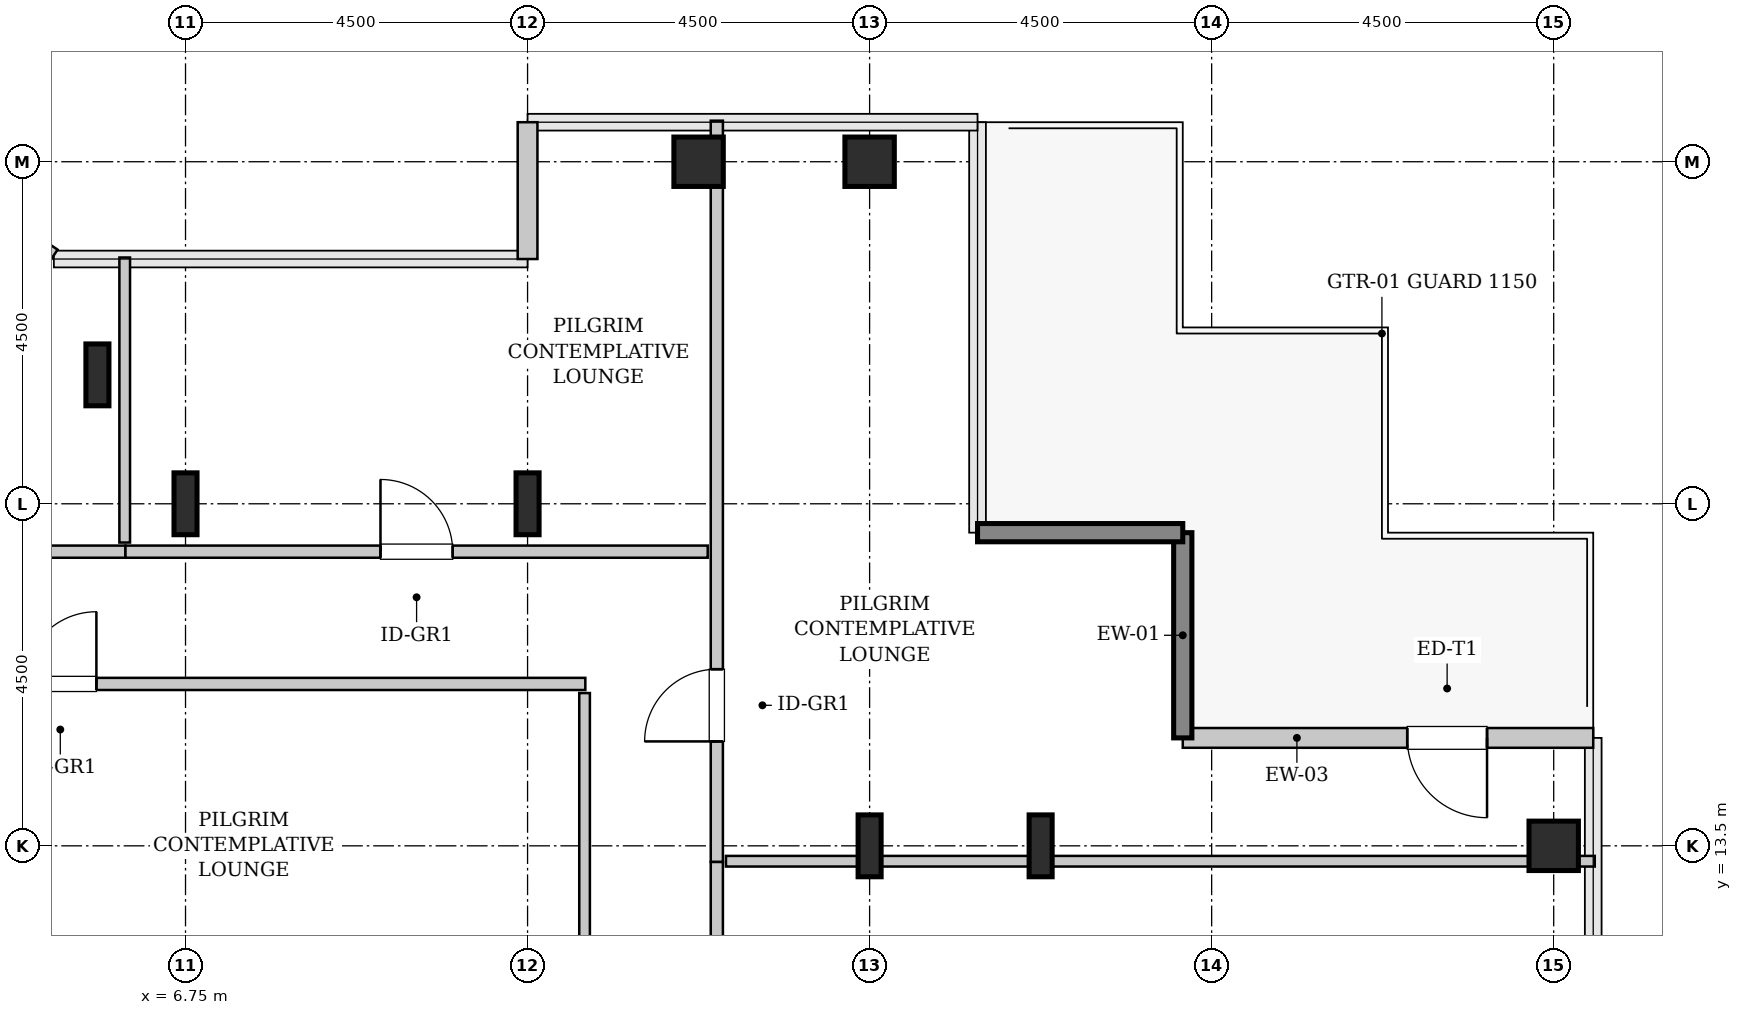
"""IFC4 building model, lengths in metres.
Left out: names, types, materials, properties, quantities, classifications, styles, units other than length and angle.
Written with IfcOpenShell. Run it as: python <this file> out.ifc"""

import sys

from ifc_helpers import new_model, si_unit, direction, frame, frame_2d, origin, origin_2d, place, context, subcontext, project, spatial, rectangle, hollow_rectangle, i_section, extrude, source, transform, mapped, element, fill, save


model = new_model("IFC4")
c1 = context("Model", 3, precision=1e-05, world=origin(), true_north=direction((0.0, 1.0)))
c2 = subcontext(c1, "Body", "Model", "MODEL_VIEW")
j1 = project(units=[si_unit("LENGTHUNIT", "METRE"), si_unit("PLANEANGLEUNIT", "RADIAN")], contexts=[c1])
p1 = place(None, origin())
s1 = spatial("IfcSite", under=j1, at=p1, CompositionType="ELEMENT")
p2 = place(p1, origin())
s2 = spatial("IfcBuilding", under=s1, at=p2, CompositionType="ELEMENT")
p3 = place(p2, frame((0.0, 0.0, 221.8)))
s3 = spatial("IfcBuildingStorey", under=s2, at=p3, CompositionType="ELEMENT", Elevation=221.8)
m1 = source(origin(), c2, "Body", "SweptSolid", [
    extrude(i_section(OverallWidth=0.303, OverallDepth=0.814, WebThickness=0.021, FlangeThickness=0.04, FilletRadius=0.03, at=origin_2d()), origin(), (0.0, 0.0, 1.0), 3.8),
])
for number, where, z_axis, x_axis in (
    (1, (5.591, 19.696, 0.0), (0.0, 0.0, 1.0), (1.0, 0.0, 0.0)),
    (2, (6.75, 18.0, 0.0), (0.0, 0.0, 1.0), (1.0, 0.0, 0.0)),
    (3, (11.25, 18.0, 0.0), (0.0, 0.0, 1.0), (1.0, 0.0, 0.0)),
):
    element("IfcColumn", number, at=place(p3, frame(where, z_axis=z_axis, x_axis=x_axis)), inside=s3, PredefinedType="COLUMN", context=c2, shape_type="MappedRepresentation", body=[
        mapped(m1, transform((0.0, 0.0, 0.0), x_axis=(1.0, 0.0, 0.0), y_axis=(0.0, 1.0, 0.0), z_axis=(0.0, 0.0, 1.0), scale=1.0)),
    ])
m2 = source(origin(), c2, "Body", "SweptSolid", [
    extrude(hollow_rectangle(XDim=0.65, YDim=0.65, WallThickness=0.032, InnerFilletRadius=0.032, OuterFilletRadius=0.064, at=origin_2d()), origin(), (0.0, 0.0, 1.0), 3.8),
])
p4 = place(p3, frame((13.5, 22.5, 0.0), z_axis=(0.0, 0.0, 1.0), x_axis=(1.0, 0.0, 0.0)))
e4 = element("IfcColumn", 4, at=p4, inside=s3, PredefinedType="COLUMN", context=c2, shape_type="MappedRepresentation", body=[
    mapped(m2, transform((0.0, 0.0, 0.0), x_axis=(1.0, 0.0, 0.0), y_axis=(0.0, 1.0, 0.0), z_axis=(0.0, 0.0, 1.0), scale=1.0)),
])
p5 = place(p3, frame((15.75, 13.5, 0.0), z_axis=(0.0, 0.0, 1.0), x_axis=(1.0, 0.0, 0.0)))
e5 = element("IfcColumn", 5, at=p5, inside=s3, PredefinedType="COLUMN", context=c2, shape_type="MappedRepresentation", body=[
    mapped(m1, transform((0.0, 0.0, 0.0), x_axis=(1.0, 0.0, 0.0), y_axis=(0.0, 1.0, 0.0), z_axis=(0.0, 0.0, 1.0), scale=1.0)),
])
p6 = place(p3, frame((15.75, 22.5, 0.0), z_axis=(0.0, 0.0, 1.0), x_axis=(1.0, 0.0, 0.0)))
e6 = element("IfcColumn", 6, at=p6, inside=s3, PredefinedType="COLUMN", context=c2, shape_type="MappedRepresentation", body=[
    mapped(m2, transform((0.0, 0.0, 0.0), x_axis=(1.0, 0.0, 0.0), y_axis=(0.0, 1.0, 0.0), z_axis=(0.0, 0.0, 1.0), scale=1.0)),
])
p7 = place(p3, frame((18.0, 13.5, 0.0), z_axis=(0.0, 0.0, 1.0), x_axis=(1.0, 0.0, 0.0)))
e7 = element("IfcColumn", 7, at=p7, inside=s3, PredefinedType="COLUMN", context=c2, shape_type="MappedRepresentation", body=[
    mapped(m1, transform((0.0, 0.0, 0.0), x_axis=(1.0, 0.0, 0.0), y_axis=(0.0, 1.0, 0.0), z_axis=(0.0, 0.0, 1.0), scale=1.0)),
])
p8 = place(p3, frame((24.75, 13.5, 0.0), z_axis=(0.0, 0.0, 1.0), x_axis=(1.0, 0.0, 0.0)))
e8 = element("IfcColumn", 8, at=p8, inside=s3, PredefinedType="COLUMN", context=c2, shape_type="MappedRepresentation", body=[
    mapped(m2, transform((0.0, 0.0, 0.0), x_axis=(1.0, 0.0, 0.0), y_axis=(0.0, 1.0, 0.0), z_axis=(0.0, 0.0, 1.0), scale=1.0)),
])
m3 = source(origin(), c2, "Body", "SweptSolid", [
    extrude(rectangle(XDim=5.4, YDim=0.26, at=frame_2d((2.7, 0.0))), origin(), (0.0, 0.0, 1.0), 3.55),
])
p9 = place(p3, frame((25.27, 14.92, 0.0), z_axis=(0.0, 0.0, 1.0), x_axis=(-1.0, 0.0, 0.0)))
e9 = element("IfcWall", 9, at=p9, inside=s3, PredefinedType="SOLIDWALL", context=c2, shape_type="MappedRepresentation", body=[
    mapped(m3, transform((0.0, 0.0, 0.0), x_axis=(1.0, 0.0, 0.0), y_axis=(0.0, 1.0, 0.0), z_axis=(0.0, 0.0, 1.0), scale=1.0)),
])
p10 = place(p9, frame((1.397, 0.0, 0.0)))
e10 = element("IfcOpeningElement", 10, at=p10, cuts=e9, PredefinedType="OPENING", context=c2, shape_type="SweptSolid", body=[
    extrude(rectangle(XDim=1.05, YDim=2.2, at=frame_2d((0.525, 1.1))), frame((0.0, 0.14, 0.0), z_axis=(0.0, -1.0, 0.0), x_axis=(1.0, 0.0, 0.0)), (0.0, 0.0, 1.0), 0.28),
])
m4 = source(origin(), c2, "Body", "SweptSolid", [
    extrude(rectangle(XDim=2.7, YDim=0.24, at=frame_2d((1.35, 0.0))), origin(), (0.0, 0.0, 1.0), 3.55),
])
for number, where, z_axis, x_axis in (
    (11, (19.87, 14.92, 0.0), (0.0, 0.0, 1.0), (0.0, 1.0, 0.0)),
    (12, (19.87, 17.62, 0.0), (0.0, 0.0, 1.0), (-1.0, 0.0, 0.0)),
):
    element("IfcWall", number, at=place(p3, frame(where, z_axis=z_axis, x_axis=x_axis)), inside=s3, PredefinedType="SHEAR", context=c2, shape_type="MappedRepresentation", body=[
        mapped(m4, transform((0.0, 0.0, 0.0), x_axis=(1.0, 0.0, 0.0), y_axis=(0.0, 1.0, 0.0), z_axis=(0.0, 0.0, 1.0), scale=1.0)),
    ])
m5 = source(origin(), c2, "Body", "SweptSolid", [
    extrude(rectangle(XDim=1.8, YDim=0.26, at=frame_2d((0.9, 0.0))), origin(), (0.0, 0.0, 1.0), 3.55),
])
p11 = place(p3, frame((11.25, 23.02, 0.0), z_axis=(0.0, 0.0, 1.0), x_axis=(0.0, -1.0, 0.0)))
e13 = element("IfcWall", 13, at=p11, inside=s3, PredefinedType="SOLIDWALL", context=c2, shape_type="MappedRepresentation", body=[
    mapped(m5, transform((0.0, 0.0, 0.0), x_axis=(1.0, 0.0, 0.0), y_axis=(0.0, 1.0, 0.0), z_axis=(0.0, 0.0, 1.0), scale=1.0)),
])
m6 = source(origin(), c2, "Body", "SweptSolid", [
    extrude(rectangle(XDim=1.469, YDim=0.26, at=frame_2d((0.734, 0.0))), origin(), (0.0, 0.0, 1.0), 3.55),
])
p12 = place(p3, frame((4.995, 21.236, 0.0), z_axis=(0.0, 0.0, 1.0), x_axis=(-0.831461760506, 0.555581983884, 0.0)))
e14 = element("IfcWall", 14, at=p12, inside=s3, PredefinedType="SOLIDWALL", context=c2, shape_type="MappedRepresentation", body=[
    mapped(m6, transform((0.0, 0.0, 0.0), x_axis=(1.0, 0.0, 0.0), y_axis=(0.0, 1.0, 0.0), z_axis=(0.0, 0.0, 1.0), scale=1.0)),
])
m7 = source(origin(), c2, "Body", "SweptSolid", [
    extrude(rectangle(XDim=9.752, YDim=0.16, at=frame_2d((4.876, 0.0))), origin(), (0.0, 0.0, 1.0), 3.535),
])
p13 = place(p3, frame((13.74, 13.288, 0.0), z_axis=(0.0, 0.0, 1.0), x_axis=(0.0, 1.0, 0.0)))
e15 = element("IfcWall", 15, at=p13, inside=s3, PredefinedType="PARTITIONING", context=c2, shape_type="MappedRepresentation", body=[
    mapped(m7, transform((0.0, 0.0, 0.0), x_axis=(1.0, 0.0, 0.0), y_axis=(0.0, 1.0, 0.0), z_axis=(0.0, 0.0, 1.0), scale=1.0)),
])
p14 = place(p13, frame((1.586, 0.0, 0.0)))
e16 = element("IfcOpeningElement", 16, at=p14, cuts=e15, PredefinedType="OPENING", context=c2, shape_type="SweptSolid", body=[
    extrude(rectangle(XDim=0.95, YDim=2.1, at=frame_2d((0.475, 1.05))), frame((0.0, 0.09, 0.0), z_axis=(0.0, -1.0, 0.0), x_axis=(1.0, 0.0, 0.0)), (0.0, 0.0, 1.0), 0.18),
])
m8 = source(origin(), c2, "Body", "SweptSolid", [
    extrude(rectangle(XDim=11.43, YDim=0.14, at=frame_2d((5.715, 0.0))), origin(), (0.0, 0.0, 1.0), 2.925),
])
p15 = place(p3, frame((13.86, 13.298, 0.0), z_axis=(0.0, 0.0, 1.0), x_axis=(1.0, 0.0, 0.0)))
e17 = element("IfcWall", 17, at=p15, inside=s3, PredefinedType="PARTITIONING", context=c2, shape_type="MappedRepresentation", body=[
    mapped(m8, transform((0.0, 0.0, 0.0), x_axis=(1.0, 0.0, 0.0), y_axis=(0.0, 1.0, 0.0), z_axis=(0.0, 0.0, 1.0), scale=1.0)),
])
m9 = source(origin(), c2, "Body", "SweptSolid", [
    extrude(rectangle(XDim=9.693, YDim=0.16, at=frame_2d((4.846, 0.0))), origin(), (0.0, 0.0, 1.0), 3.535),
])
p16 = place(p3, frame((13.74, 3.595, 0.0), z_axis=(0.0, 0.0, 1.0), x_axis=(0.0, 1.0, 0.0)))
e18 = element("IfcWall", 18, at=p16, inside=s3, PredefinedType="PARTITIONING", context=c2, shape_type="MappedRepresentation", body=[
    mapped(m9, transform((0.0, 0.0, 0.0), x_axis=(1.0, 0.0, 0.0), y_axis=(0.0, 1.0, 0.0), z_axis=(0.0, 0.0, 1.0), scale=1.0)),
])
p17 = place(p16, frame((4.371, 0.0, 0.0)))
e19 = element("IfcOpeningElement", 19, at=p17, cuts=e18, PredefinedType="OPENING", context=c2, shape_type="SweptSolid", body=[
    extrude(rectangle(XDim=0.95, YDim=2.1, at=frame_2d((0.475, 1.05))), frame((0.0, 0.09, 0.0), z_axis=(0.0, -1.0, 0.0), x_axis=(1.0, 0.0, 0.0)), (0.0, 0.0, 1.0), 0.18),
])
m10 = source(origin(), c2, "Body", "SweptSolid", [
    extrude(rectangle(XDim=7.765, YDim=0.16, at=frame_2d((3.882, 0.0))), origin(), (0.0, 0.0, 1.0), 3.535),
])
p18 = place(p3, frame((-1.805, 17.37, 0.0), z_axis=(0.0, 0.0, 1.0), x_axis=(1.0, 0.0, 0.0)))
e20 = element("IfcWall", 20, at=p18, inside=s3, PredefinedType="PARTITIONING", context=c2, shape_type="MappedRepresentation", body=[
    mapped(m10, transform((0.0, 0.0, 0.0), x_axis=(1.0, 0.0, 0.0), y_axis=(0.0, 1.0, 0.0), z_axis=(0.0, 0.0, 1.0), scale=1.0)),
])
p19 = place(p18, frame((2.407, 0.0, 0.0)))
e21 = element("IfcOpeningElement", 21, at=p19, cuts=e20, PredefinedType="OPENING", context=c2, shape_type="SweptSolid", body=[
    extrude(rectangle(XDim=0.95, YDim=2.1, at=frame_2d((0.475, 1.05))), frame((0.0, 0.09, 0.0), z_axis=(0.0, -1.0, 0.0), x_axis=(1.0, 0.0, 0.0)), (0.0, 0.0, 1.0), 0.18),
])
m11 = source(origin(), c2, "Body", "SweptSolid", [
    extrude(rectangle(XDim=3.75, YDim=0.14, at=frame_2d((1.875, 0.0))), origin(), (0.0, 0.0, 1.0), 3.535),
])
p20 = place(p3, frame((5.95, 17.49, 0.0), z_axis=(0.0, 0.0, 1.0), x_axis=(0.0, 1.0, 0.0)))
e22 = element("IfcWall", 22, at=p20, inside=s3, PredefinedType="PARTITIONING", context=c2, shape_type="MappedRepresentation", body=[
    mapped(m11, transform((0.0, 0.0, 0.0), x_axis=(1.0, 0.0, 0.0), y_axis=(0.0, 1.0, 0.0), z_axis=(0.0, 0.0, 1.0), scale=1.0)),
])
m12 = source(origin(), c2, "Body", "SweptSolid", [
    extrude(rectangle(XDim=7.66, YDim=0.16, at=frame_2d((3.83, 0.0))), origin(), (0.0, 0.0, 1.0), 3.535),
])
p21 = place(p3, frame((5.96, 17.37, 0.0), z_axis=(0.0, 0.0, 1.0), x_axis=(1.0, 0.0, 0.0)))
e23 = element("IfcWall", 23, at=p21, inside=s3, PredefinedType="PARTITIONING", context=c2, shape_type="MappedRepresentation", body=[
    mapped(m12, transform((0.0, 0.0, 0.0), x_axis=(1.0, 0.0, 0.0), y_axis=(0.0, 1.0, 0.0), z_axis=(0.0, 0.0, 1.0), scale=1.0)),
])
p22 = place(p21, frame((3.355, 0.0, 0.0)))
e24 = element("IfcOpeningElement", 24, at=p22, cuts=e23, PredefinedType="OPENING", context=c2, shape_type="SweptSolid", body=[
    extrude(rectangle(XDim=0.95, YDim=2.1, at=frame_2d((0.475, 1.05))), frame((0.0, 0.09, 0.0), z_axis=(0.0, -1.0, 0.0), x_axis=(1.0, 0.0, 0.0)), (0.0, 0.0, 1.0), 0.18),
])
m13 = source(origin(), c2, "Body", "SweptSolid", [
    extrude(rectangle(XDim=13.815, YDim=0.16, at=frame_2d((6.907, 0.0))), origin(), (0.0, 0.0, 1.0), 3.535),
])
p23 = place(p3, frame((-1.805, 15.63, 0.0), z_axis=(0.0, 0.0, 1.0), x_axis=(1.0, 0.0, 0.0)))
e25 = element("IfcWall", 25, at=p23, inside=s3, PredefinedType="PARTITIONING", context=c2, shape_type="MappedRepresentation", body=[
    mapped(m13, transform((0.0, 0.0, 0.0), x_axis=(1.0, 0.0, 0.0), y_axis=(0.0, 1.0, 0.0), z_axis=(0.0, 0.0, 1.0), scale=1.0)),
])
p24 = place(p23, frame((6.433, 0.0, 0.0)))
e26 = element("IfcOpeningElement", 26, at=p24, cuts=e25, PredefinedType="OPENING", context=c2, shape_type="SweptSolid", body=[
    extrude(rectangle(XDim=0.95, YDim=2.1, at=frame_2d((0.475, 1.05))), frame((0.0, 0.09, 0.0), z_axis=(0.0, -1.0, 0.0), x_axis=(1.0, 0.0, 0.0)), (0.0, 0.0, 1.0), 0.18),
])
m14 = source(origin(), c2, "Body", "SweptSolid", [
    extrude(rectangle(XDim=3.93, YDim=0.14, at=frame_2d((1.965, 0.0))), origin(), (0.0, 0.0, 1.0), 3.535),
])
p25 = place(p3, frame((12.0, 11.58, 0.0), z_axis=(0.0, 0.0, 1.0), x_axis=(0.0, 1.0, 0.0)))
e27 = element("IfcWall", 27, at=p25, inside=s3, PredefinedType="PARTITIONING", context=c2, shape_type="MappedRepresentation", body=[
    mapped(m14, transform((0.0, 0.0, 0.0), x_axis=(1.0, 0.0, 0.0), y_axis=(0.0, 1.0, 0.0), z_axis=(0.0, 0.0, 1.0), scale=1.0)),
])
m15 = source(origin(), c2, "Body", "SweptSolid", [
    extrude(rectangle(XDim=1.05, YDim=2.2, at=frame_2d((0.525, 1.1))), frame((0.0, 0.025, 0.0), z_axis=(0.0, -1.0, 0.0), x_axis=(1.0, 0.0, 0.0)), (0.0, 0.0, 1.0), 0.05),
])
p26 = place(p10, origin())
e28 = element("IfcDoor", 28, at=p26, inside=s3, OperationType="SINGLE_SWING_LEFT", PredefinedType="DOOR", context=c2, shape_type="MappedRepresentation", body=[
    mapped(m15, transform((0.0, 0.0, 0.0), x_axis=(1.0, 0.0, 0.0), y_axis=(0.0, 1.0, 0.0), z_axis=(0.0, 0.0, 1.0), scale=1.0)),
])
fill(e10, e28)
m16 = source(origin(), c2, "Body", "SweptSolid", [
    extrude(rectangle(XDim=0.95, YDim=2.1, at=frame_2d((0.475, 1.05))), frame((0.0, 0.025, 0.0), z_axis=(0.0, -1.0, 0.0), x_axis=(1.0, 0.0, 0.0)), (0.0, 0.0, 1.0), 0.05),
])
p27 = place(p14, origin())
e29 = element("IfcDoor", 29, at=p27, inside=s3, OperationType="SINGLE_SWING_LEFT", PredefinedType="DOOR", context=c2, shape_type="MappedRepresentation", body=[
    mapped(m16, transform((0.0, 0.0, 0.0), x_axis=(1.0, 0.0, 0.0), y_axis=(0.0, 1.0, 0.0), z_axis=(0.0, 0.0, 1.0), scale=1.0)),
])
fill(e16, e29)
p28 = place(p22, origin())
e30 = element("IfcDoor", 30, at=p28, inside=s3, OperationType="SINGLE_SWING_LEFT", PredefinedType="DOOR", context=c2, shape_type="MappedRepresentation", body=[
    mapped(m16, transform((0.0, 0.0, 0.0), x_axis=(1.0, 0.0, 0.0), y_axis=(0.0, 1.0, 0.0), z_axis=(0.0, 0.0, 1.0), scale=1.0)),
])
fill(e24, e30)
p29 = place(p24, origin())
e31 = element("IfcDoor", 31, at=p29, inside=s3, OperationType="SINGLE_SWING_RIGHT", PredefinedType="DOOR", context=c2, shape_type="MappedRepresentation", body=[
    mapped(m16, transform((0.0, 0.0, 0.0), x_axis=(1.0, 0.0, 0.0), y_axis=(0.0, 1.0, 0.0), z_axis=(0.0, 0.0, 1.0), scale=1.0)),
])
fill(e26, e31)
save(model, sys.argv[1])
